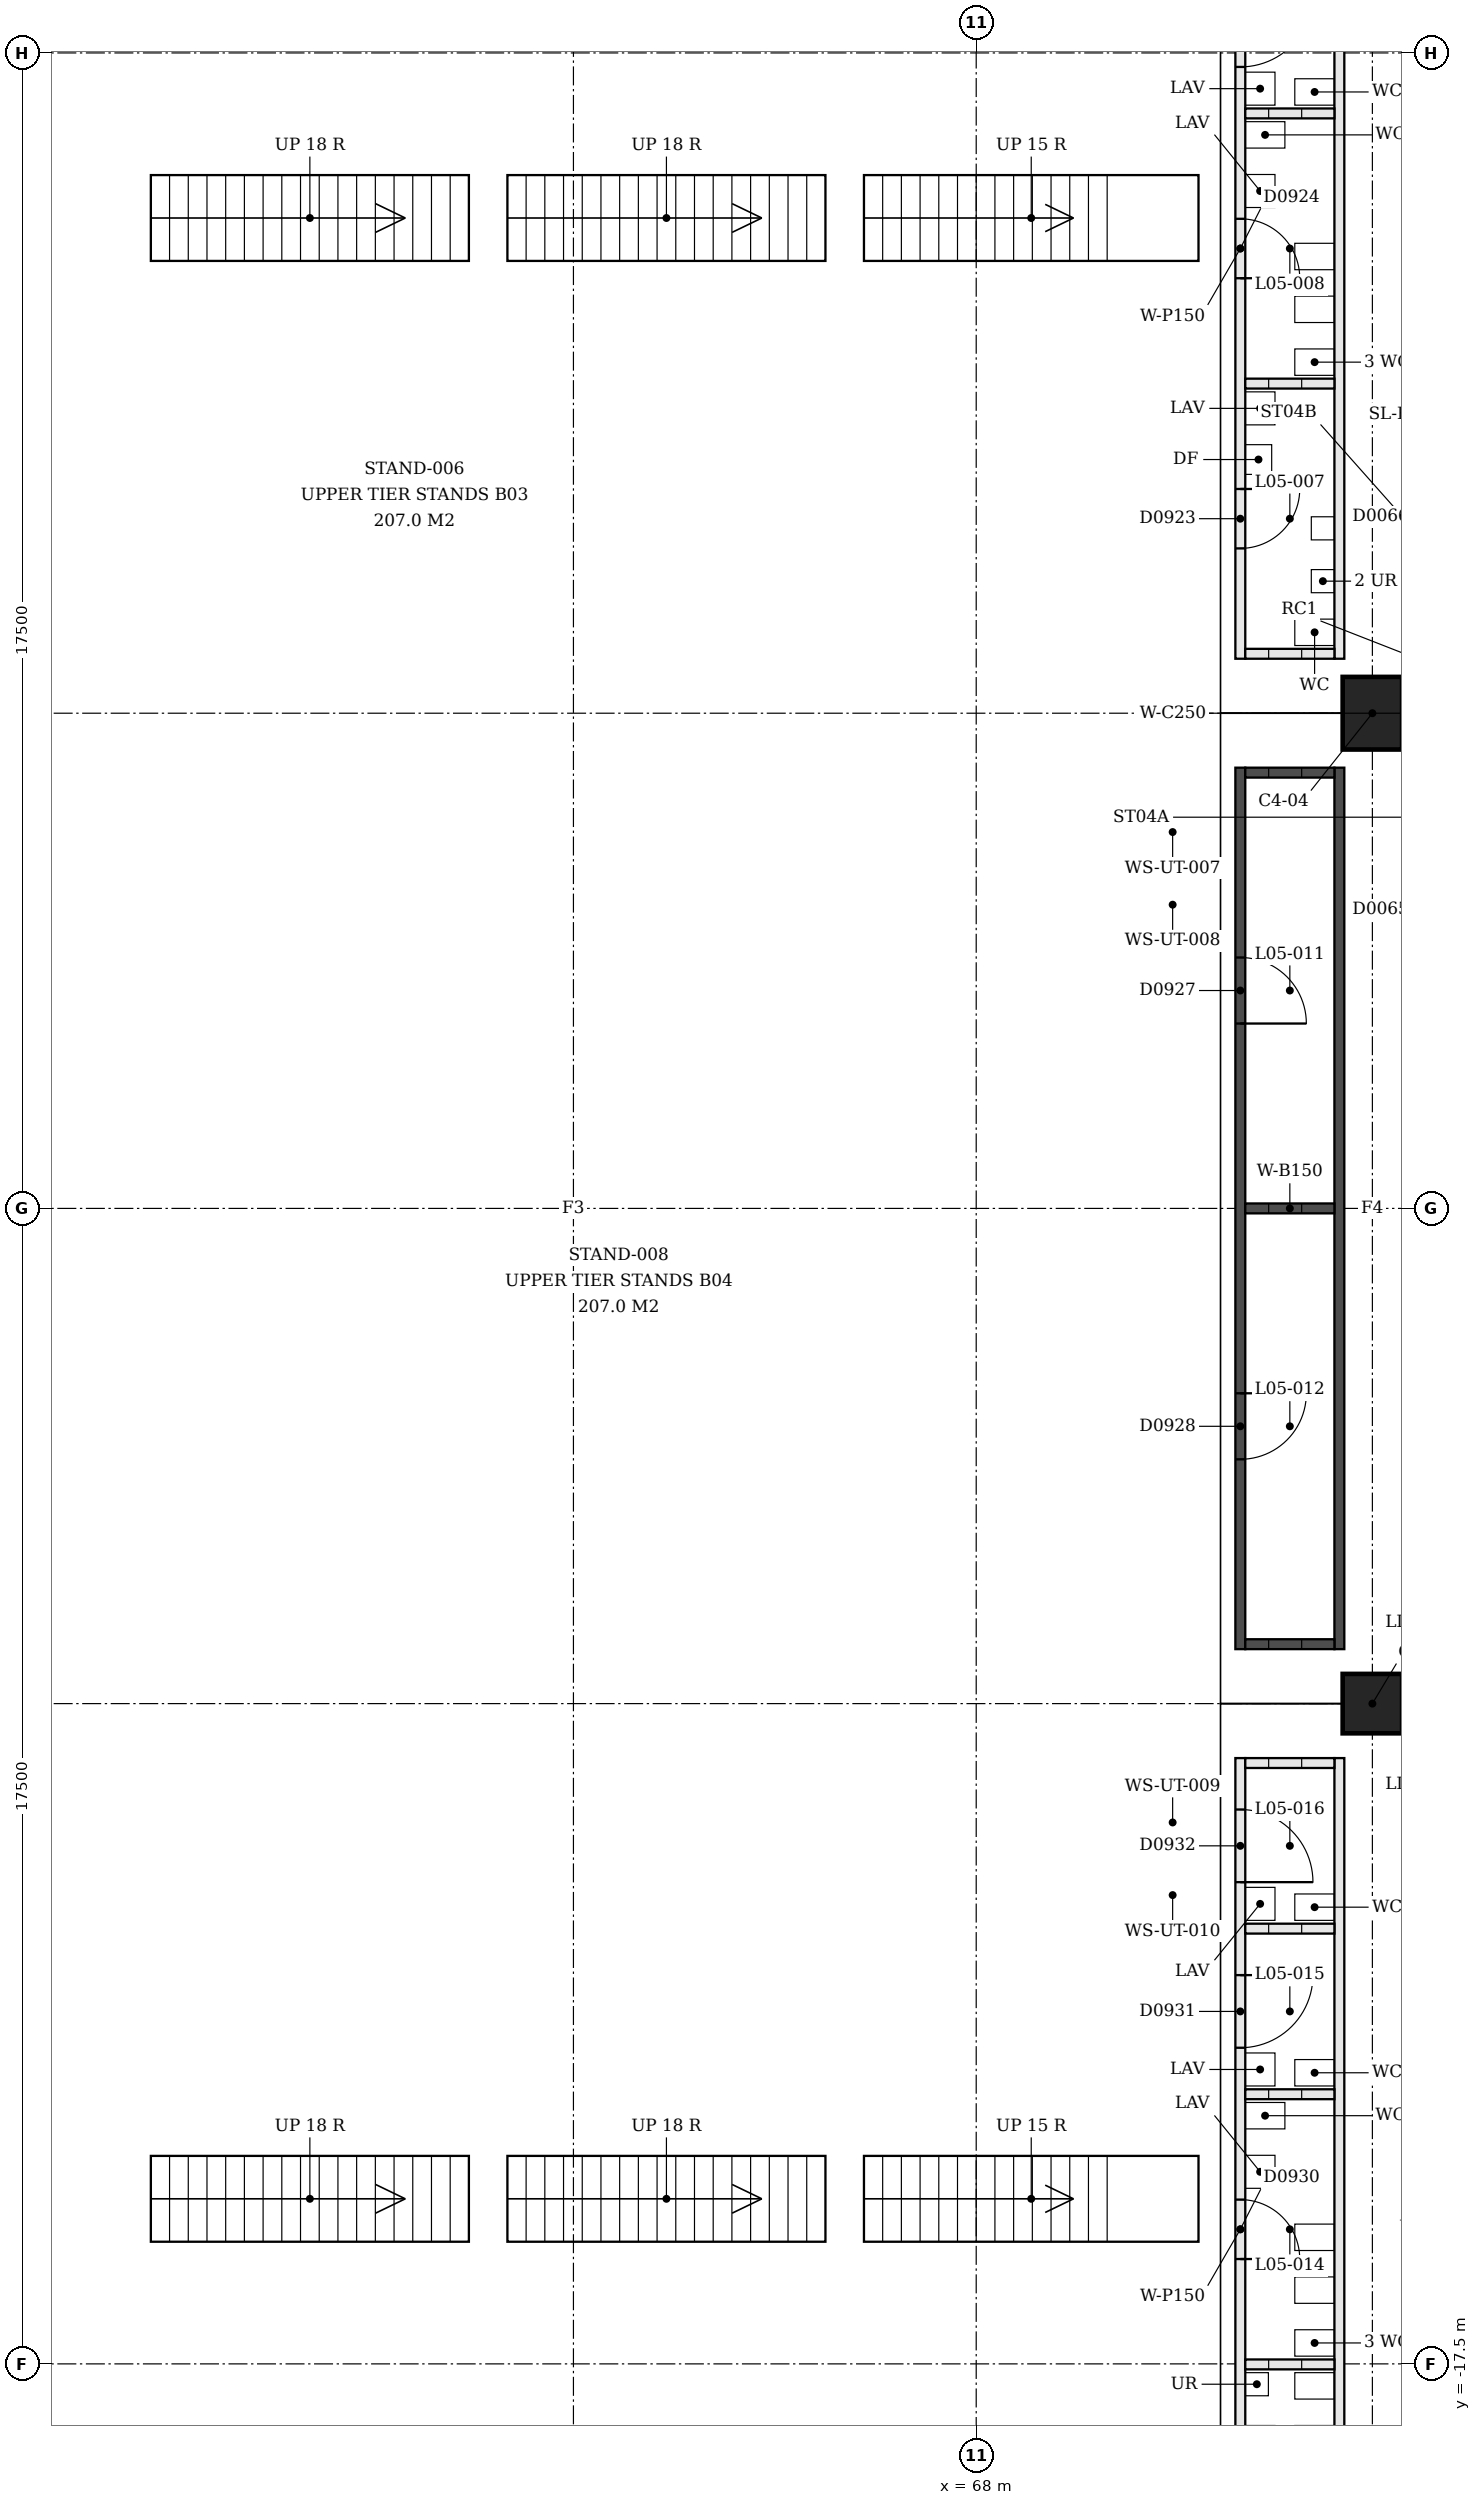
"""IFC4 building model, lengths in metres.
Left out: names, types, materials, properties, quantities, classifications, styles, units other than length and angle.
Written with IfcOpenShell. Run it as: python <this file> out.ifc"""

import sys

from ifc_helpers import new_model, si_unit, direction, frame, frame_2d, origin, origin_2d, place, context, subcontext, project, spatial, rectangle, extrude, element, fill, save


model = new_model("IFC4")
c1 = context("Model", 3, precision=1e-05, world=origin(), true_north=direction((0.0, 1.0)))
c2 = subcontext(c1, "Body", "Model", "MODEL_VIEW")
j1 = project(units=[si_unit("LENGTHUNIT", "METRE"), si_unit("PLANEANGLEUNIT", "RADIAN")], contexts=[c1])
p1 = place(None, origin())
s1 = spatial("IfcSite", under=j1, at=p1, CompositionType="ELEMENT")
p2 = place(p1, origin())
s2 = spatial("IfcBuilding", under=s1, at=p2, CompositionType="ELEMENT")
p3 = place(p2, frame((0.0, 0.0, 22.5)))
s3 = spatial("IfcBuildingStorey", under=s2, at=p3, CompositionType="ELEMENT", Elevation=22.5)
p4 = place(p3, frame((74.0, 7.5, 0.0), z_axis=(0.0, 0.0, 1.0), x_axis=(0.0, 1.0, 0.0)))
e1 = element("IfcColumn", 1, at=p4, inside=s3, PredefinedType="COLUMN", context=c2, shape_type="SweptSolid", body=[
    extrude(rectangle(XDim=1.1, YDim=0.9, at=origin_2d()), origin(), (0.0, 0.0, 1.0), 6.5),
])
p5 = place(p3, frame((74.0, -7.5, 0.0), z_axis=(0.0, 0.0, 1.0), x_axis=(0.0, 1.0, 0.0)))
e2 = element("IfcColumn", 2, at=p5, inside=s3, PredefinedType="COLUMN", context=c2, shape_type="SweptSolid", body=[
    extrude(rectangle(XDim=0.9, YDim=0.9, at=origin_2d()), origin(), (0.0, 0.0, 1.0), 6.5),
])
p6 = place(p3, frame((72.0, 8.325, 0.0), z_axis=(0.0, 0.0, 1.0), x_axis=(0.0, 1.0, 0.0)))
e3 = element("IfcWall", 3, at=p6, inside=s3, PredefinedType="PARTITIONING", context=c2, shape_type="SweptSolid", body=[
    extrude(rectangle(XDim=13.35, YDim=0.15, at=frame_2d((6.675, 0.0))), origin(), (0.0, 0.0, 1.0), 3.0),
])
p7 = place(p6, frame((1.671, 0.0, 0.0)))
e4 = element("IfcOpeningElement", 4, at=p7, cuts=e3, PredefinedType="OPENING", context=c2, shape_type="SweptSolid", body=[
    extrude(rectangle(XDim=0.9, YDim=2.1, at=frame_2d((0.45, 1.05))), frame((0.0, 0.075, 0.0), z_axis=(0.0, -1.0, 0.0), x_axis=(1.0, 0.0, 0.0)), (0.0, 0.0, 1.0), 0.15),
])
p8 = place(p6, frame((5.763, 0.0, 0.0)))
e5 = element("IfcOpeningElement", 5, at=p8, cuts=e3, PredefinedType="OPENING", context=c2, shape_type="SweptSolid", body=[
    extrude(rectangle(XDim=0.9, YDim=2.1, at=frame_2d((0.45, 1.05))), frame((0.0, 0.075, 0.0), z_axis=(0.0, -1.0, 0.0), x_axis=(1.0, 0.0, 0.0)), (0.0, 0.0, 1.0), 0.15),
])
p9 = place(p6, frame((8.963, 0.0, 0.0)))
e6 = element("IfcOpeningElement", 6, at=p9, cuts=e3, PredefinedType="OPENING", context=c2, shape_type="SweptSolid", body=[
    extrude(rectangle(XDim=1.1, YDim=2.1, at=frame_2d((0.55, 1.05))), frame((0.0, 0.075, 0.0), z_axis=(0.0, -1.0, 0.0), x_axis=(1.0, 0.0, 0.0)), (0.0, 0.0, 1.0), 0.15),
])
p10 = place(p6, frame((11.471, 0.0, 0.0)))
e7 = element("IfcOpeningElement", 7, at=p10, cuts=e3, PredefinedType="OPENING", context=c2, shape_type="SweptSolid", body=[
    extrude(rectangle(XDim=1.1, YDim=2.1, at=frame_2d((0.55, 1.05))), frame((0.0, 0.075, 0.0), z_axis=(0.0, -1.0, 0.0), x_axis=(1.0, 0.0, 0.0)), (0.0, 0.0, 1.0), 0.15),
])
p11 = place(p3, frame((73.5, 8.325, 0.0), z_axis=(0.0, 0.0, 1.0), x_axis=(0.0, 1.0, 0.0)))
e8 = element("IfcWall", 8, at=p11, inside=s3, PredefinedType="PARTITIONING", context=c2, shape_type="SweptSolid", body=[
    extrude(rectangle(XDim=13.35, YDim=0.15, at=frame_2d((6.675, 0.0))), origin(), (0.0, 0.0, 1.0), 3.0),
])
for number, where, z_axis, x_axis in (
    (9, (72.075, 8.4, 0.0), (0.0, 0.0, 1.0), (1.0, 0.0, 0.0)),
    (10, (72.075, 12.492, 0.0), (0.0, 0.0, 1.0), (1.0, 0.0, 0.0)),
    (11, (72.075, 16.584, 0.0), (0.0, 0.0, 1.0), (1.0, 0.0, 0.0)),
):
    element("IfcWall", number, at=place(p3, frame(where, z_axis=z_axis, x_axis=x_axis)), inside=s3, PredefinedType="PARTITIONING", context=c2, shape_type="SweptSolid", body=[
        extrude(rectangle(XDim=1.35, YDim=0.15, at=frame_2d((0.675, 0.0))), origin(), (0.0, 0.0, 1.0), 3.0),
    ])
p12 = place(p3, frame((72.0, 6.675, 0.0), z_axis=(0.0, 0.0, 1.0), x_axis=(0.0, -1.0, 0.0)))
e12 = element("IfcWall", 12, at=p12, inside=s3, PredefinedType="SOLIDWALL", context=c2, shape_type="SweptSolid", body=[
    extrude(rectangle(XDim=13.35, YDim=0.15, at=frame_2d((6.675, 0.0))), origin(), (0.0, 0.0, 1.0), 3.0),
])
p13 = place(p12, frame((2.875, 0.0, 0.0)))
e13 = element("IfcOpeningElement", 13, at=p13, cuts=e12, PredefinedType="OPENING", context=c2, shape_type="SweptSolid", body=[
    extrude(rectangle(XDim=1.0, YDim=2.1, at=frame_2d((0.5, 1.05))), frame((0.0, 0.075, 0.0), z_axis=(0.0, -1.0, 0.0), x_axis=(1.0, 0.0, 0.0)), (0.0, 0.0, 1.0), 0.15),
])
p14 = place(p12, frame((9.475, 0.0, 0.0)))
e14 = element("IfcOpeningElement", 14, at=p14, cuts=e12, PredefinedType="OPENING", context=c2, shape_type="SweptSolid", body=[
    extrude(rectangle(XDim=1.0, YDim=2.1, at=frame_2d((0.5, 1.05))), frame((0.0, 0.075, 0.0), z_axis=(0.0, -1.0, 0.0), x_axis=(1.0, 0.0, 0.0)), (0.0, 0.0, 1.0), 0.15),
])
p15 = place(p3, frame((73.5, 6.675, 0.0), z_axis=(0.0, 0.0, 1.0), x_axis=(0.0, -1.0, 0.0)))
e15 = element("IfcWall", 15, at=p15, inside=s3, PredefinedType="SOLIDWALL", context=c2, shape_type="SweptSolid", body=[
    extrude(rectangle(XDim=13.35, YDim=0.15, at=frame_2d((6.675, 0.0))), origin(), (0.0, 0.0, 1.0), 3.0),
])
for number, where, z_axis, x_axis in (
    (16, (72.075, 6.6, 0.0), (0.0, 0.0, 1.0), (1.0, 0.0, 0.0)),
    (17, (72.075, 0.0, 0.0), (0.0, 0.0, 1.0), (1.0, 0.0, 0.0)),
    (18, (72.075, -6.6, 0.0), (0.0, 0.0, 1.0), (1.0, 0.0, 0.0)),
):
    element("IfcWall", number, at=place(p3, frame(where, z_axis=z_axis, x_axis=x_axis)), inside=s3, PredefinedType="SOLIDWALL", context=c2, shape_type="SweptSolid", body=[
        extrude(rectangle(XDim=1.35, YDim=0.15, at=frame_2d((0.675, 0.0))), origin(), (0.0, 0.0, 1.0), 3.0),
    ])
p16 = place(p3, frame((72.0, -21.675, 0.0), z_axis=(0.0, 0.0, 1.0), x_axis=(0.0, 1.0, 0.0)))
e19 = element("IfcWall", 19, at=p16, inside=s3, PredefinedType="PARTITIONING", context=c2, shape_type="SweptSolid", body=[
    extrude(rectangle(XDim=13.35, YDim=0.15, at=frame_2d((6.675, 0.0))), origin(), (0.0, 0.0, 1.0), 3.0),
])
p17 = place(p16, frame((1.671, 0.0, 0.0)))
e20 = element("IfcOpeningElement", 20, at=p17, cuts=e19, PredefinedType="OPENING", context=c2, shape_type="SweptSolid", body=[
    extrude(rectangle(XDim=0.9, YDim=2.1, at=frame_2d((0.45, 1.05))), frame((0.0, 0.075, 0.0), z_axis=(0.0, -1.0, 0.0), x_axis=(1.0, 0.0, 0.0)), (0.0, 0.0, 1.0), 0.15),
])
p18 = place(p16, frame((5.763, 0.0, 0.0)))
e21 = element("IfcOpeningElement", 21, at=p18, cuts=e19, PredefinedType="OPENING", context=c2, shape_type="SweptSolid", body=[
    extrude(rectangle(XDim=0.9, YDim=2.1, at=frame_2d((0.45, 1.05))), frame((0.0, 0.075, 0.0), z_axis=(0.0, -1.0, 0.0), x_axis=(1.0, 0.0, 0.0)), (0.0, 0.0, 1.0), 0.15),
])
p19 = place(p16, frame((8.963, 0.0, 0.0)))
e22 = element("IfcOpeningElement", 22, at=p19, cuts=e19, PredefinedType="OPENING", context=c2, shape_type="SweptSolid", body=[
    extrude(rectangle(XDim=1.1, YDim=2.1, at=frame_2d((0.55, 1.05))), frame((0.0, 0.075, 0.0), z_axis=(0.0, -1.0, 0.0), x_axis=(1.0, 0.0, 0.0)), (0.0, 0.0, 1.0), 0.15),
])
p20 = place(p16, frame((11.471, 0.0, 0.0)))
e23 = element("IfcOpeningElement", 23, at=p20, cuts=e19, PredefinedType="OPENING", context=c2, shape_type="SweptSolid", body=[
    extrude(rectangle(XDim=1.1, YDim=2.1, at=frame_2d((0.55, 1.05))), frame((0.0, 0.075, 0.0), z_axis=(0.0, -1.0, 0.0), x_axis=(1.0, 0.0, 0.0)), (0.0, 0.0, 1.0), 0.15),
])
p21 = place(p3, frame((73.5, -21.675, 0.0), z_axis=(0.0, 0.0, 1.0), x_axis=(0.0, 1.0, 0.0)))
e24 = element("IfcWall", 24, at=p21, inside=s3, PredefinedType="PARTITIONING", context=c2, shape_type="SweptSolid", body=[
    extrude(rectangle(XDim=13.35, YDim=0.15, at=frame_2d((6.675, 0.0))), origin(), (0.0, 0.0, 1.0), 3.0),
])
for number, where, z_axis, x_axis in (
    (25, (72.075, -17.508, 0.0), (0.0, 0.0, 1.0), (1.0, 0.0, 0.0)),
    (26, (72.075, -13.416, 0.0), (0.0, 0.0, 1.0), (1.0, 0.0, 0.0)),
    (27, (72.075, -10.908, 0.0), (0.0, 0.0, 1.0), (1.0, 0.0, 0.0)),
    (28, (72.075, -8.4, 0.0), (0.0, 0.0, 1.0), (1.0, 0.0, 0.0)),
):
    element("IfcWall", number, at=place(p3, frame(where, z_axis=z_axis, x_axis=x_axis)), inside=s3, PredefinedType="PARTITIONING", context=c2, shape_type="SweptSolid", body=[
        extrude(rectangle(XDim=1.35, YDim=0.15, at=frame_2d((0.675, 0.0))), origin(), (0.0, 0.0, 1.0), 3.0),
    ])
p22 = place(p7, origin())
e29 = element("IfcDoor", 29, at=p22, inside=s3, OperationType="SINGLE_SWING_RIGHT", PredefinedType="DOOR", context=c2, shape_type="SweptSolid", body=[
    extrude(rectangle(XDim=0.9, YDim=2.1, at=frame_2d((0.45, 1.05))), frame((0.0, 0.025, 0.0), z_axis=(0.0, -1.0, 0.0), x_axis=(1.0, 0.0, 0.0)), (0.0, 0.0, 1.0), 0.05),
])
fill(e4, e29)
p23 = place(p8, origin())
e30 = element("IfcDoor", 30, at=p23, inside=s3, OperationType="SINGLE_SWING_LEFT", PredefinedType="DOOR", context=c2, shape_type="SweptSolid", body=[
    extrude(rectangle(XDim=0.9, YDim=2.1, at=frame_2d((0.45, 1.05))), frame((0.0, 0.025, 0.0), z_axis=(0.0, -1.0, 0.0), x_axis=(1.0, 0.0, 0.0)), (0.0, 0.0, 1.0), 0.05),
])
fill(e5, e30)
p24 = place(p9, origin())
e31 = element("IfcDoor", 31, at=p24, inside=s3, OperationType="SINGLE_SWING_RIGHT", PredefinedType="DOOR", context=c2, shape_type="SweptSolid", body=[
    extrude(rectangle(XDim=1.1, YDim=2.1, at=frame_2d((0.55, 1.05))), frame((0.0, 0.025, 0.0), z_axis=(0.0, -1.0, 0.0), x_axis=(1.0, 0.0, 0.0)), (0.0, 0.0, 1.0), 0.05),
])
fill(e6, e31)
p25 = place(p13, origin())
e32 = element("IfcDoor", 32, at=p25, inside=s3, OperationType="SINGLE_SWING_LEFT", PredefinedType="DOOR", context=c2, shape_type="SweptSolid", body=[
    extrude(rectangle(XDim=1.0, YDim=2.1, at=frame_2d((0.5, 1.05))), frame((0.0, 0.025, 0.0), z_axis=(0.0, -1.0, 0.0), x_axis=(1.0, 0.0, 0.0)), (0.0, 0.0, 1.0), 0.05),
])
fill(e13, e32)
p26 = place(p14, origin())
e33 = element("IfcDoor", 33, at=p26, inside=s3, OperationType="SINGLE_SWING_RIGHT", PredefinedType="DOOR", context=c2, shape_type="SweptSolid", body=[
    extrude(rectangle(XDim=1.0, YDim=2.1, at=frame_2d((0.5, 1.05))), frame((0.0, 0.025, 0.0), z_axis=(0.0, -1.0, 0.0), x_axis=(1.0, 0.0, 0.0)), (0.0, 0.0, 1.0), 0.05),
])
fill(e14, e33)
p27 = place(p18, origin())
e34 = element("IfcDoor", 34, at=p27, inside=s3, OperationType="SINGLE_SWING_LEFT", PredefinedType="DOOR", context=c2, shape_type="SweptSolid", body=[
    extrude(rectangle(XDim=0.9, YDim=2.1, at=frame_2d((0.45, 1.05))), frame((0.0, 0.025, 0.0), z_axis=(0.0, -1.0, 0.0), x_axis=(1.0, 0.0, 0.0)), (0.0, 0.0, 1.0), 0.05),
])
fill(e21, e34)
p28 = place(p19, origin())
e35 = element("IfcDoor", 35, at=p28, inside=s3, OperationType="SINGLE_SWING_RIGHT", PredefinedType="DOOR", context=c2, shape_type="SweptSolid", body=[
    extrude(rectangle(XDim=1.1, YDim=2.1, at=frame_2d((0.55, 1.05))), frame((0.0, 0.025, 0.0), z_axis=(0.0, -1.0, 0.0), x_axis=(1.0, 0.0, 0.0)), (0.0, 0.0, 1.0), 0.05),
])
fill(e22, e35)
p29 = place(p20, origin())
e36 = element("IfcDoor", 36, at=p29, inside=s3, OperationType="SINGLE_SWING_LEFT", PredefinedType="DOOR", context=c2, shape_type="SweptSolid", body=[
    extrude(rectangle(XDim=1.1, YDim=2.1, at=frame_2d((0.55, 1.05))), frame((0.0, 0.025, 0.0), z_axis=(0.0, -1.0, 0.0), x_axis=(1.0, 0.0, 0.0)), (0.0, 0.0, 1.0), 0.05),
])
fill(e23, e36)
save(model, sys.argv[1])
